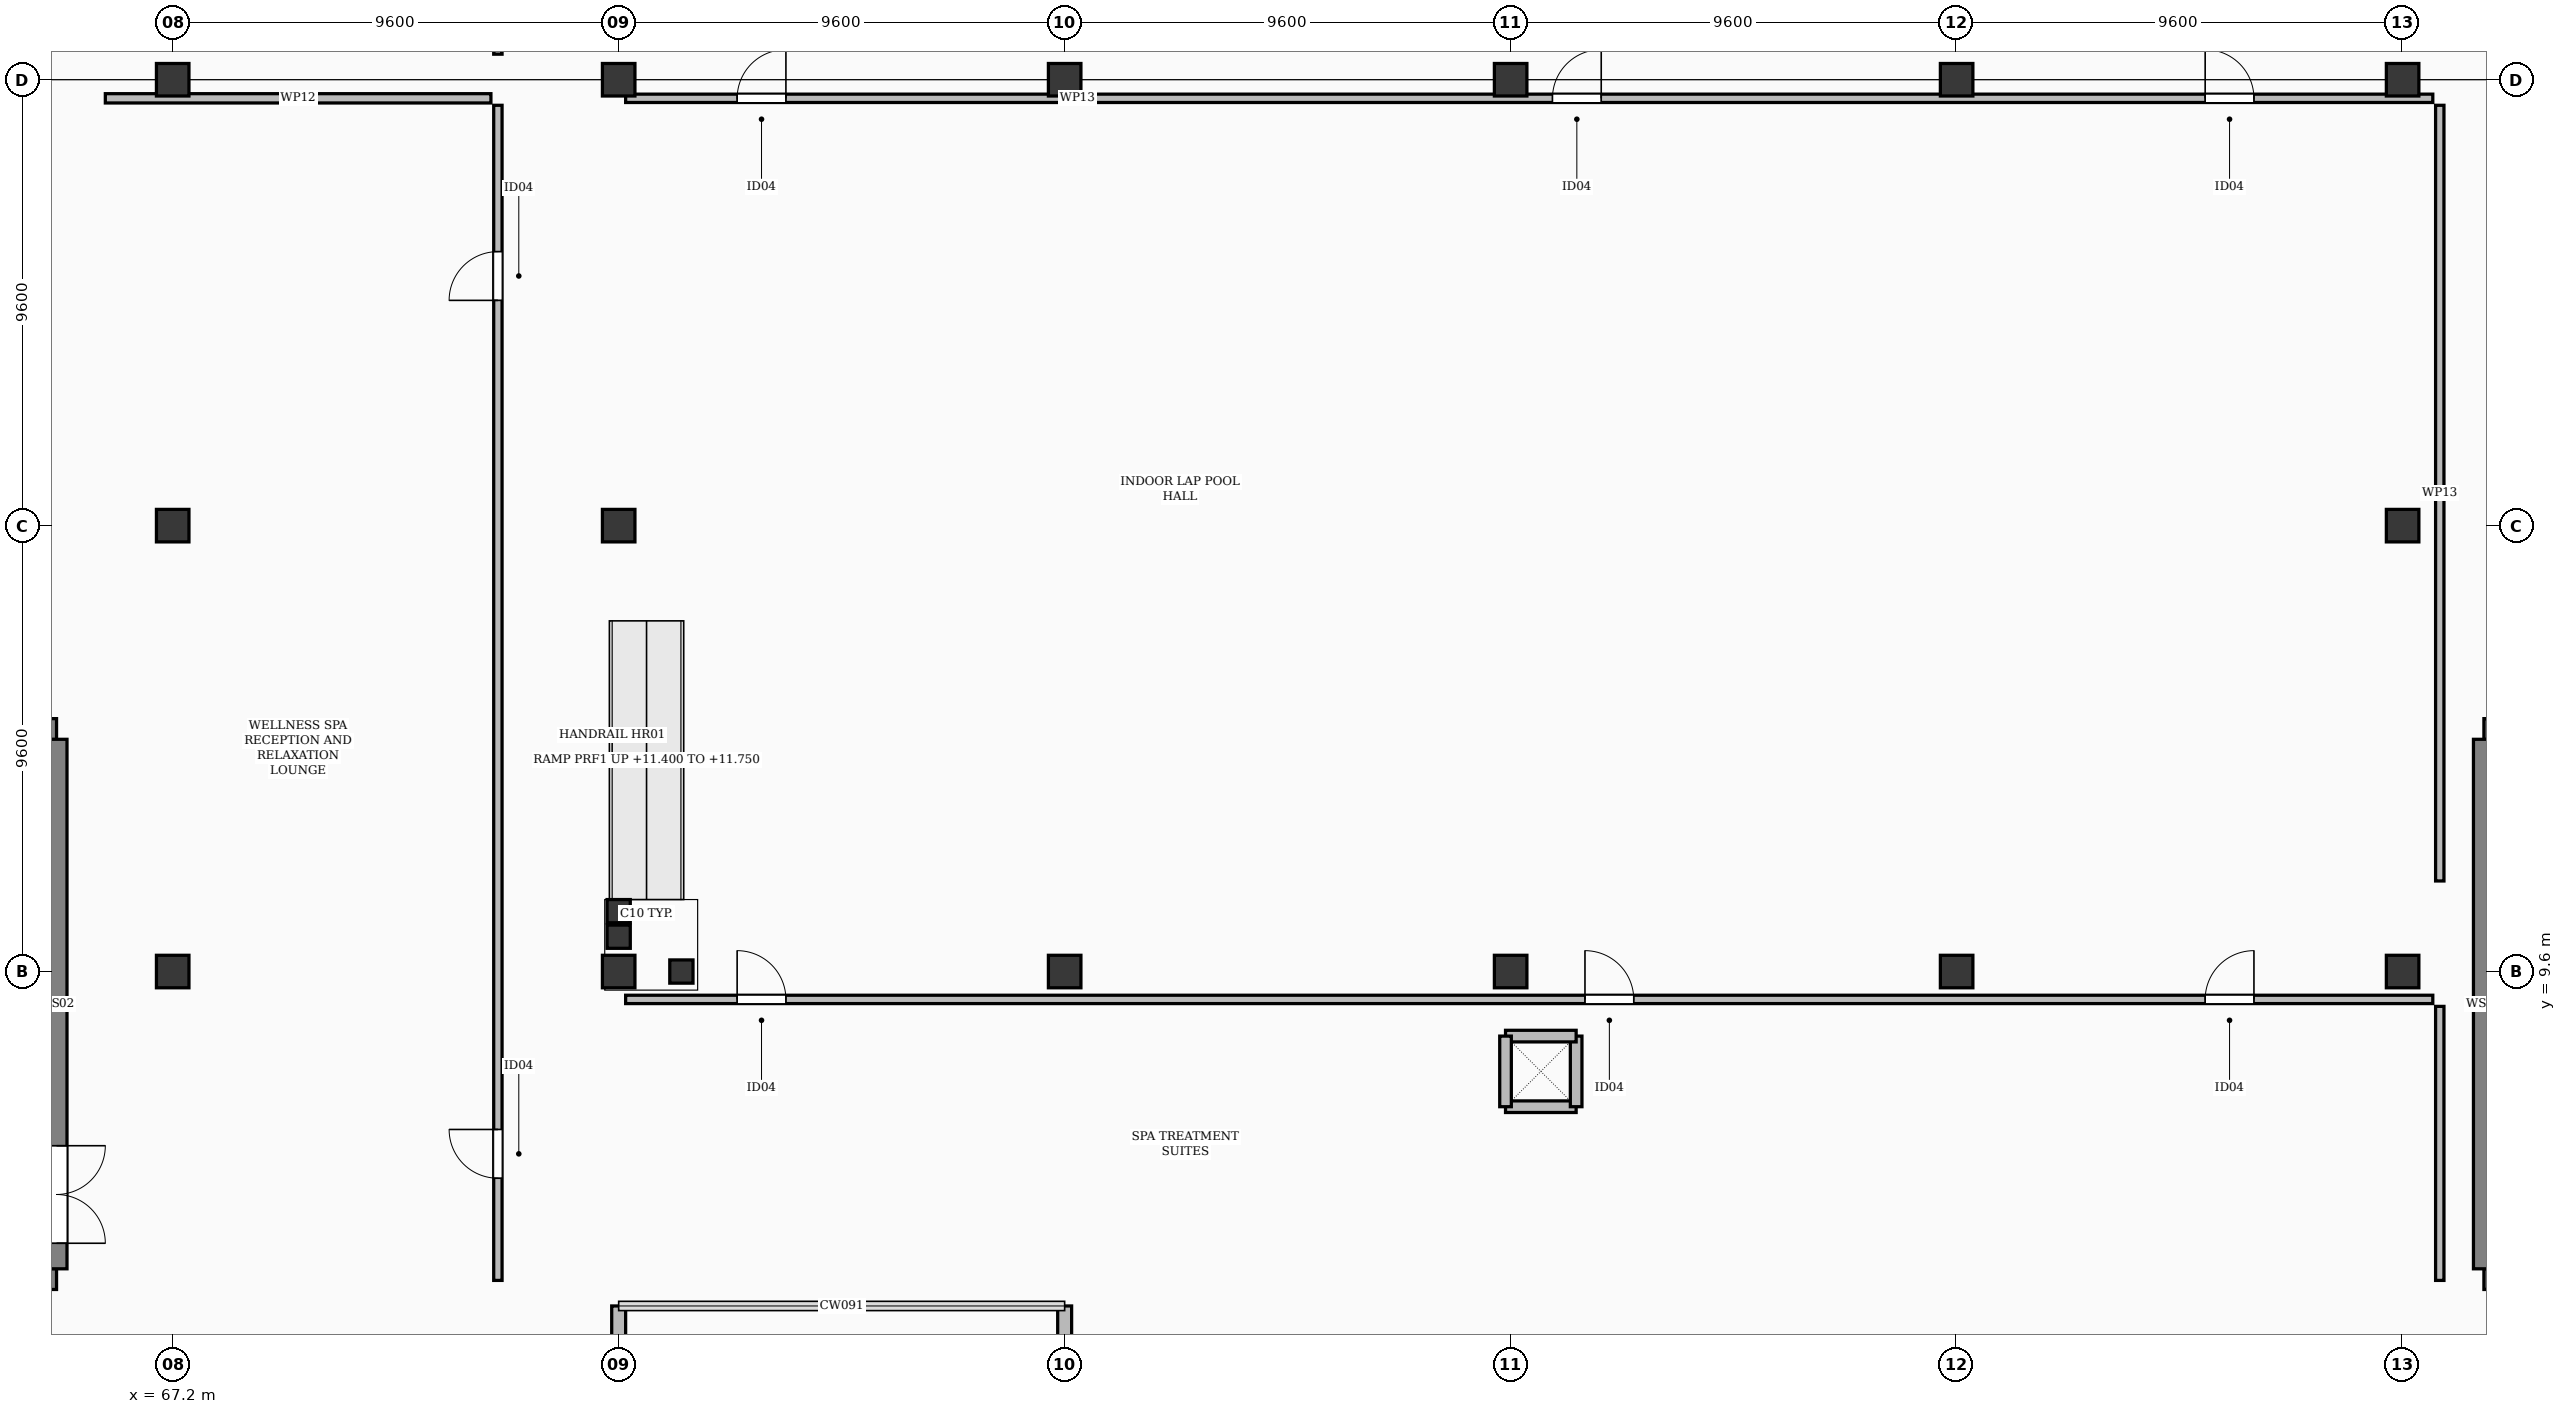
"""IFC4 building model, lengths in metres.
Left out: names, types, materials, properties, quantities, classifications, styles, units other than length and angle.
Written with IfcOpenShell. Run it as: python <this file> out.ifc"""

import sys

from ifc_helpers import new_model, si_unit, direction, frame, frame_2d, origin, origin_2d, place, context, subcontext, project, spatial, rectangle, extrude, element, fill, save


model = new_model("IFC4")
c1 = context("Model", 3, precision=1e-05, world=origin(), true_north=direction((0.0, 1.0)))
c2 = subcontext(c1, "Body", "Model", "MODEL_VIEW")
j1 = project(units=[si_unit("LENGTHUNIT", "METRE"), si_unit("PLANEANGLEUNIT", "RADIAN")], contexts=[c1])
p1 = place(None, origin())
s1 = spatial("IfcSite", under=j1, at=p1, CompositionType="ELEMENT")
p2 = place(p1, origin())
s2 = spatial("IfcBuilding", under=s1, at=p2, CompositionType="ELEMENT")
p3 = place(p2, frame((0.0, 0.0, 11.4)))
s3 = spatial("IfcBuildingStorey", under=s2, at=p3, CompositionType="ELEMENT", Elevation=11.4)
for number, where, z_axis, x_axis in (
    (1, (67.2, 9.6, 0.0), (0.0, 0.0, 1.0), (1.0, 0.0, 0.0)),
    (2, (67.2, 19.2, 0.0), (0.0, 0.0, 1.0), (1.0, 0.0, 0.0)),
    (3, (67.2, 28.8, 0.0), (0.0, 0.0, 1.0), (1.0, 0.0, 0.0)),
    (4, (76.8, 9.6, 0.0), (0.0, 0.0, 1.0), (1.0, 0.0, 0.0)),
    (5, (76.8, 19.2, 0.0), (0.0, 0.0, 1.0), (1.0, 0.0, 0.0)),
    (6, (76.8, 28.8, 0.0), (0.0, 0.0, 1.0), (1.0, 0.0, 0.0)),
    (7, (86.4, 9.6, 0.0), (0.0, 0.0, 1.0), (1.0, 0.0, 0.0)),
    (8, (86.4, 28.8, 0.0), (0.0, 0.0, 1.0), (1.0, 0.0, 0.0)),
    (9, (96.0, 9.6, 0.0), (0.0, 0.0, 1.0), (1.0, 0.0, 0.0)),
    (10, (96.0, 28.8, 0.0), (0.0, 0.0, 1.0), (1.0, 0.0, 0.0)),
    (11, (105.6, 9.6, 0.0), (0.0, 0.0, 1.0), (1.0, 0.0, 0.0)),
    (12, (105.6, 28.8, 0.0), (0.0, 0.0, 1.0), (1.0, 0.0, 0.0)),
    (13, (115.2, 9.6, 0.0), (0.0, 0.0, 1.0), (1.0, 0.0, 0.0)),
    (14, (115.2, 19.2, 0.0), (0.0, 0.0, 1.0), (1.0, 0.0, 0.0)),
    (15, (115.2, 28.8, 0.0), (0.0, 0.0, 1.0), (1.0, 0.0, 0.0)),
):
    element("IfcColumn", number, at=place(p3, frame(where, z_axis=z_axis, x_axis=x_axis)), inside=s3, PredefinedType="COLUMN", context=c2, shape_type="SweptSolid", body=[
        extrude(rectangle(XDim=0.7, YDim=0.7, at=origin_2d()), origin(), (0.0, 0.0, 1.0), 4.8),
    ])
for number, where, z_axis, x_axis in (
    (16, (76.8, 2.4, 0.0), (0.0, 0.0, 1.0), (0.0, -1.0, 0.0)),
    (17, (86.4, 0.05, 0.0), (0.0, 0.0, 1.0), (0.0, 1.0, 0.0)),
):
    element("IfcWall", number, at=place(p3, frame(where, z_axis=z_axis, x_axis=x_axis)), inside=s3, PredefinedType="SOLIDWALL", context=c2, shape_type="SweptSolid", body=[
        extrude(rectangle(XDim=2.35, YDim=0.3, at=frame_2d((1.175, 0.0))), origin(), (0.0, 0.0, 1.0), 3.662),
    ])
for number, where, z_axis, x_axis in (
    (18, (59.55, 2.98, 0.0), (0.0, 0.0, 1.0), (1.0, 0.0, 0.0)),
    (19, (59.55, 14.82, 0.0), (0.0, 0.0, 1.0), (1.0, 0.0, 0.0)),
):
    element("IfcWall", number, at=place(p3, frame(where, z_axis=z_axis, x_axis=x_axis)), inside=s3, PredefinedType="SHEAR", context=c2, shape_type="SweptSolid", body=[
        extrude(rectangle(XDim=5.15, YDim=0.45, at=frame_2d((2.575, 0.0))), origin(), (0.0, 0.0, 1.0), 4.42),
    ])
p4 = place(p3, frame((64.7, 3.2, 0.0), z_axis=(0.0, 0.0, 1.0), x_axis=(0.0, 1.0, 0.0)))
e20 = element("IfcWall", 20, at=p4, inside=s3, PredefinedType="SHEAR", context=c2, shape_type="SweptSolid", body=[
    extrude(rectangle(XDim=11.4, YDim=0.45, at=frame_2d((5.7, 0.0))), origin(), (0.0, 0.0, 1.0), 4.42),
])
p5 = place(p4, frame((0.55, 0.0, 0.0)))
e21 = element("IfcOpeningElement", 21, at=p5, cuts=e20, PredefinedType="OPENING", context=c2, shape_type="SweptSolid", body=[
    extrude(rectangle(XDim=2.1, YDim=2.2, at=frame_2d((1.05, 1.1))), frame((0.0, 0.237, 0.0), z_axis=(0.0, -1.0, 0.0), x_axis=(1.0, 0.0, 0.0)), (0.0, 0.0, 1.0), 0.474),
])
for number, where, z_axis, x_axis in (
    (22, (116.95, 2.98, 0.0), (0.0, 0.0, 1.0), (1.0, 0.0, 0.0)),
    (23, (116.95, 14.82, 0.0), (0.0, 0.0, 1.0), (1.0, 0.0, 0.0)),
):
    element("IfcWall", number, at=place(p3, frame(where, z_axis=z_axis, x_axis=x_axis)), inside=s3, PredefinedType="SHEAR", context=c2, shape_type="SweptSolid", body=[
        extrude(rectangle(XDim=5.15, YDim=0.45, at=frame_2d((2.575, 0.0))), origin(), (0.0, 0.0, 1.0), 4.42),
    ])
p6 = place(p3, frame((116.95, 3.2, 0.0), z_axis=(0.0, 0.0, 1.0), x_axis=(0.0, 1.0, 0.0)))
e24 = element("IfcWall", 24, at=p6, inside=s3, PredefinedType="SHEAR", context=c2, shape_type="SweptSolid", body=[
    extrude(rectangle(XDim=11.4, YDim=0.45, at=frame_2d((5.7, 0.0))), origin(), (0.0, 0.0, 1.0), 4.42),
])
for number, where, z_axis, x_axis in (
    (25, (76.8, 10.35, 0.0), (0.0, 0.0, 1.0), (1.0, 0.0, 0.0)),
    (26, (76.8, 10.9, 0.0), (0.0, 0.0, 1.0), (1.0, 0.0, 0.0)),
    (27, (78.15, 9.6, 0.0), (0.0, 0.0, 1.0), (1.0, 0.0, 0.0)),
):
    element("IfcColumn", number, at=place(p3, frame(where, z_axis=z_axis, x_axis=x_axis)), inside=s3, PredefinedType="COLUMN", context=c2, shape_type="SweptSolid", body=[
        extrude(rectangle(XDim=0.5, YDim=0.5, at=origin_2d()), origin(), (0.0, 0.0, 1.0), 0.13),
    ])
p7 = place(p3, frame((95.89, 6.69, 0.0), z_axis=(0.0, 0.0, 1.0), x_axis=(1.0, 0.0, 0.0)))
e28 = element("IfcWall", 28, at=p7, inside=s3, PredefinedType="SOLIDWALL", context=c2, shape_type="SweptSolid", body=[
    extrude(rectangle(XDim=1.52, YDim=0.25, at=frame_2d((0.76, 0.0))), origin(), (0.0, 0.0, 1.0), 3.692),
])
p8 = place(p3, frame((97.41, 6.69, 0.0), z_axis=(0.0, 0.0, 1.0), x_axis=(0.0, 1.0, 0.0)))
e29 = element("IfcWall", 29, at=p8, inside=s3, PredefinedType="SOLIDWALL", context=c2, shape_type="SweptSolid", body=[
    extrude(rectangle(XDim=1.52, YDim=0.25, at=frame_2d((0.76, 0.0))), origin(), (0.0, 0.0, 1.0), 4.42),
])
for number, where, z_axis, x_axis in (
    (30, (97.41, 8.21, 0.0), (0.0, 0.0, 1.0), (-1.0, 0.0, 0.0)),
    (31, (95.89, 8.21, 0.0), (0.0, 0.0, 1.0), (0.0, -1.0, 0.0)),
):
    element("IfcWall", number, at=place(p3, frame(where, z_axis=z_axis, x_axis=x_axis)), inside=s3, PredefinedType="SOLIDWALL", context=c2, shape_type="SweptSolid", body=[
        extrude(rectangle(XDim=1.52, YDim=0.25, at=frame_2d((0.76, 0.0))), origin(), (0.0, 0.0, 1.0), 3.692),
    ])
p9 = place(p3, frame((74.2, 29.35, 0.0), z_axis=(0.0, 0.0, 1.0), x_axis=(0.0, 1.0, 0.0)))
e32 = element("IfcWall", 32, at=p9, inside=s3, PredefinedType="PARTITIONING", context=c2, shape_type="SweptSolid", body=[
    extrude(rectangle(XDim=14.5, YDim=0.18, at=frame_2d((7.25, 0.0))), origin(), (0.0, 0.0, 1.0), 3.692),
])
p10 = place(p9, frame((2.2, 0.0, 0.0)))
e33 = element("IfcOpeningElement", 33, at=p10, cuts=e32, PredefinedType="OPENING", context=c2, shape_type="SweptSolid", body=[
    extrude(rectangle(XDim=1.85, YDim=2.35, at=frame_2d((0.925, 1.175))), frame((0.0, 0.102, 0.0), z_axis=(0.0, -1.0, 0.0), x_axis=(1.0, 0.0, 0.0)), (0.0, 0.0, 1.0), 0.204),
])
p11 = place(p9, frame((10.3, 0.0, 0.0)))
e34 = element("IfcOpeningElement", 34, at=p11, cuts=e32, PredefinedType="OPENING", context=c2, shape_type="SweptSolid", body=[
    extrude(rectangle(XDim=1.85, YDim=2.35, at=frame_2d((0.925, 1.175))), frame((0.0, 0.102, 0.0), z_axis=(0.0, -1.0, 0.0), x_axis=(1.0, 0.0, 0.0)), (0.0, 0.0, 1.0), 0.204),
])
p12 = place(p3, frame((74.2, 2.95, 0.0), z_axis=(0.0, 0.0, 1.0), x_axis=(0.0, 1.0, 0.0)))
e35 = element("IfcWall", 35, at=p12, inside=s3, PredefinedType="PARTITIONING", context=c2, shape_type="SweptSolid", body=[
    extrude(rectangle(XDim=25.3, YDim=0.18, at=frame_2d((12.65, 0.0))), origin(), (0.0, 0.0, 1.0), 3.692),
])
p13 = place(p12, frame((2.2, 0.0, 0.0)))
e36 = element("IfcOpeningElement", 36, at=p13, cuts=e35, PredefinedType="OPENING", context=c2, shape_type="SweptSolid", body=[
    extrude(rectangle(XDim=1.05, YDim=2.18, at=frame_2d((0.525, 1.09))), frame((0.0, 0.102, 0.0), z_axis=(0.0, -1.0, 0.0), x_axis=(1.0, 0.0, 0.0)), (0.0, 0.0, 1.0), 0.204),
])
p14 = place(p12, frame((21.1, 0.0, 0.0)))
e37 = element("IfcOpeningElement", 37, at=p14, cuts=e35, PredefinedType="OPENING", context=c2, shape_type="SweptSolid", body=[
    extrude(rectangle(XDim=1.05, YDim=2.18, at=frame_2d((0.525, 1.09))), frame((0.0, 0.102, 0.0), z_axis=(0.0, -1.0, 0.0), x_axis=(1.0, 0.0, 0.0)), (0.0, 0.0, 1.0), 0.204),
])
p15 = place(p3, frame((65.75, 28.4, 0.0), z_axis=(0.0, 0.0, 1.0), x_axis=(1.0, 0.0, 0.0)))
e38 = element("IfcWall", 38, at=p15, inside=s3, PredefinedType="PARTITIONING", context=c2, shape_type="SweptSolid", body=[
    extrude(rectangle(XDim=8.3, YDim=0.2, at=frame_2d((4.15, 0.0))), origin(), (0.0, 0.0, 1.0), 3.692),
])
p16 = place(p3, frame((76.95, 28.4, 0.0), z_axis=(0.0, 0.0, 1.0), x_axis=(1.0, 0.0, 0.0)))
e39 = element("IfcWall", 39, at=p16, inside=s3, PredefinedType="PARTITIONING", context=c2, shape_type="SweptSolid", body=[
    extrude(rectangle(XDim=38.9, YDim=0.18, at=frame_2d((19.45, 0.0))), origin(), (0.0, 0.0, 1.0), 3.692),
])
p17 = place(p16, frame((2.4, 0.0, 0.0)))
e40 = element("IfcOpeningElement", 40, at=p17, cuts=e39, PredefinedType="OPENING", context=c2, shape_type="SweptSolid", body=[
    extrude(rectangle(XDim=1.05, YDim=2.18, at=frame_2d((0.525, 1.09))), frame((0.0, 0.102, 0.0), z_axis=(0.0, -1.0, 0.0), x_axis=(1.0, 0.0, 0.0)), (0.0, 0.0, 1.0), 0.204),
])
p18 = place(p16, frame((34.0, 0.0, 0.0)))
e41 = element("IfcOpeningElement", 41, at=p18, cuts=e39, PredefinedType="OPENING", context=c2, shape_type="SweptSolid", body=[
    extrude(rectangle(XDim=1.05, YDim=2.18, at=frame_2d((0.525, 1.09))), frame((0.0, 0.102, 0.0), z_axis=(0.0, -1.0, 0.0), x_axis=(1.0, 0.0, 0.0)), (0.0, 0.0, 1.0), 0.204),
])
p19 = place(p16, frame((19.95, 0.0, 0.0)))
e42 = element("IfcOpeningElement", 42, at=p19, cuts=e39, PredefinedType="OPENING", context=c2, shape_type="SweptSolid", body=[
    extrude(rectangle(XDim=1.05, YDim=2.18, at=frame_2d((0.525, 1.09))), frame((0.0, 0.102, 0.0), z_axis=(0.0, -1.0, 0.0), x_axis=(1.0, 0.0, 0.0)), (0.0, 0.0, 1.0), 0.204),
])
p20 = place(p3, frame((116.0, 11.55, 0.0), z_axis=(0.0, 0.0, 1.0), x_axis=(0.0, 1.0, 0.0)))
e43 = element("IfcWall", 43, at=p20, inside=s3, PredefinedType="PARTITIONING", context=c2, shape_type="SweptSolid", body=[
    extrude(rectangle(XDim=16.7, YDim=0.18, at=frame_2d((8.35, 0.0))), origin(), (0.0, 0.0, 1.0), 3.692),
])
p21 = place(p3, frame((76.95, 9.0, 0.0), z_axis=(0.0, 0.0, 1.0), x_axis=(1.0, 0.0, 0.0)))
e44 = element("IfcWall", 44, at=p21, inside=s3, PredefinedType="PARTITIONING", context=c2, shape_type="SweptSolid", body=[
    extrude(rectangle(XDim=38.9, YDim=0.18, at=frame_2d((19.45, 0.0))), origin(), (0.0, 0.0, 1.0), 3.692),
])
p22 = place(p21, frame((2.4, 0.0, 0.0)))
e45 = element("IfcOpeningElement", 45, at=p22, cuts=e44, PredefinedType="OPENING", context=c2, shape_type="SweptSolid", body=[
    extrude(rectangle(XDim=1.05, YDim=2.18, at=frame_2d((0.525, 1.09))), frame((0.0, 0.102, 0.0), z_axis=(0.0, -1.0, 0.0), x_axis=(1.0, 0.0, 0.0)), (0.0, 0.0, 1.0), 0.204),
])
p23 = place(p21, frame((34.0, 0.0, 0.0)))
e46 = element("IfcOpeningElement", 46, at=p23, cuts=e44, PredefinedType="OPENING", context=c2, shape_type="SweptSolid", body=[
    extrude(rectangle(XDim=1.05, YDim=2.18, at=frame_2d((0.525, 1.09))), frame((0.0, 0.102, 0.0), z_axis=(0.0, -1.0, 0.0), x_axis=(1.0, 0.0, 0.0)), (0.0, 0.0, 1.0), 0.204),
])
p24 = place(p21, frame((20.65, 0.0, 0.0)))
e47 = element("IfcOpeningElement", 47, at=p24, cuts=e44, PredefinedType="OPENING", context=c2, shape_type="SweptSolid", body=[
    extrude(rectangle(XDim=1.05, YDim=2.18, at=frame_2d((0.525, 1.09))), frame((0.0, 0.102, 0.0), z_axis=(0.0, -1.0, 0.0), x_axis=(1.0, 0.0, 0.0)), (0.0, 0.0, 1.0), 0.204),
])
p25 = place(p3, frame((116.0, 2.95, 0.0), z_axis=(0.0, 0.0, 1.0), x_axis=(0.0, 1.0, 0.0)))
e48 = element("IfcWall", 48, at=p25, inside=s3, PredefinedType="PARTITIONING", context=c2, shape_type="SweptSolid", body=[
    extrude(rectangle(XDim=5.9, YDim=0.18, at=frame_2d((2.95, 0.0))), origin(), (0.0, 0.0, 1.0), 4.42),
])
p26 = place(p5, frame((2.1, 0.0, 0.0), z_axis=(0.0, 0.0, 1.0), x_axis=(-1.0, 0.0, 0.0)))
e49 = element("IfcDoor", 49, at=p26, inside=s3, OperationType="DOUBLE_DOOR_SINGLE_SWING", PredefinedType="DOOR", context=c2, shape_type="SweptSolid", body=[
    extrude(rectangle(XDim=2.1, YDim=2.2, at=frame_2d((1.05, 1.1))), frame((0.0, 0.025, 0.0), z_axis=(0.0, -1.0, 0.0), x_axis=(1.0, 0.0, 0.0)), (0.0, 0.0, 1.0), 0.05),
])
fill(e21, e49)
p27 = place(p13, origin())
e50 = element("IfcDoor", 50, at=p27, inside=s3, OperationType="SINGLE_SWING_RIGHT", PredefinedType="DOOR", context=c2, shape_type="SweptSolid", body=[
    extrude(rectangle(XDim=1.05, YDim=2.18, at=frame_2d((0.525, 1.09))), frame((0.0, 0.025, 0.0), z_axis=(0.0, -1.0, 0.0), x_axis=(1.0, 0.0, 0.0)), (0.0, 0.0, 1.0), 0.05),
])
fill(e36, e50)
p28 = place(p14, origin())
e51 = element("IfcDoor", 51, at=p28, inside=s3, OperationType="SINGLE_SWING_LEFT", PredefinedType="DOOR", context=c2, shape_type="SweptSolid", body=[
    extrude(rectangle(XDim=1.05, YDim=2.18, at=frame_2d((0.525, 1.09))), frame((0.0, 0.025, 0.0), z_axis=(0.0, -1.0, 0.0), x_axis=(1.0, 0.0, 0.0)), (0.0, 0.0, 1.0), 0.05),
])
fill(e37, e51)
p29 = place(p17, origin())
e52 = element("IfcDoor", 52, at=p29, inside=s3, OperationType="SINGLE_SWING_RIGHT", PredefinedType="DOOR", context=c2, shape_type="SweptSolid", body=[
    extrude(rectangle(XDim=1.05, YDim=2.18, at=frame_2d((0.525, 1.09))), frame((0.0, 0.025, 0.0), z_axis=(0.0, -1.0, 0.0), x_axis=(1.0, 0.0, 0.0)), (0.0, 0.0, 1.0), 0.05),
])
fill(e40, e52)
p30 = place(p18, origin())
e53 = element("IfcDoor", 53, at=p30, inside=s3, OperationType="SINGLE_SWING_LEFT", PredefinedType="DOOR", context=c2, shape_type="SweptSolid", body=[
    extrude(rectangle(XDim=1.05, YDim=2.18, at=frame_2d((0.525, 1.09))), frame((0.0, 0.025, 0.0), z_axis=(0.0, -1.0, 0.0), x_axis=(1.0, 0.0, 0.0)), (0.0, 0.0, 1.0), 0.05),
])
fill(e41, e53)
p31 = place(p19, origin())
e54 = element("IfcDoor", 54, at=p31, inside=s3, OperationType="SINGLE_SWING_RIGHT", PredefinedType="DOOR", context=c2, shape_type="SweptSolid", body=[
    extrude(rectangle(XDim=1.05, YDim=2.18, at=frame_2d((0.525, 1.09))), frame((0.0, 0.025, 0.0), z_axis=(0.0, -1.0, 0.0), x_axis=(1.0, 0.0, 0.0)), (0.0, 0.0, 1.0), 0.05),
])
fill(e42, e54)
p32 = place(p22, origin())
e55 = element("IfcDoor", 55, at=p32, inside=s3, OperationType="SINGLE_SWING_LEFT", PredefinedType="DOOR", context=c2, shape_type="SweptSolid", body=[
    extrude(rectangle(XDim=1.05, YDim=2.18, at=frame_2d((0.525, 1.09))), frame((0.0, 0.025, 0.0), z_axis=(0.0, -1.0, 0.0), x_axis=(1.0, 0.0, 0.0)), (0.0, 0.0, 1.0), 0.05),
])
fill(e45, e55)
p33 = place(p23, origin())
e56 = element("IfcDoor", 56, at=p33, inside=s3, OperationType="SINGLE_SWING_RIGHT", PredefinedType="DOOR", context=c2, shape_type="SweptSolid", body=[
    extrude(rectangle(XDim=1.05, YDim=2.18, at=frame_2d((0.525, 1.09))), frame((0.0, 0.025, 0.0), z_axis=(0.0, -1.0, 0.0), x_axis=(1.0, 0.0, 0.0)), (0.0, 0.0, 1.0), 0.05),
])
fill(e46, e56)
p34 = place(p24, origin())
e57 = element("IfcDoor", 57, at=p34, inside=s3, OperationType="SINGLE_SWING_LEFT", PredefinedType="DOOR", context=c2, shape_type="SweptSolid", body=[
    extrude(rectangle(XDim=1.05, YDim=2.18, at=frame_2d((0.525, 1.09))), frame((0.0, 0.025, 0.0), z_axis=(0.0, -1.0, 0.0), x_axis=(1.0, 0.0, 0.0)), (0.0, 0.0, 1.0), 0.05),
])
fill(e47, e57)
save(model, sys.argv[1])
